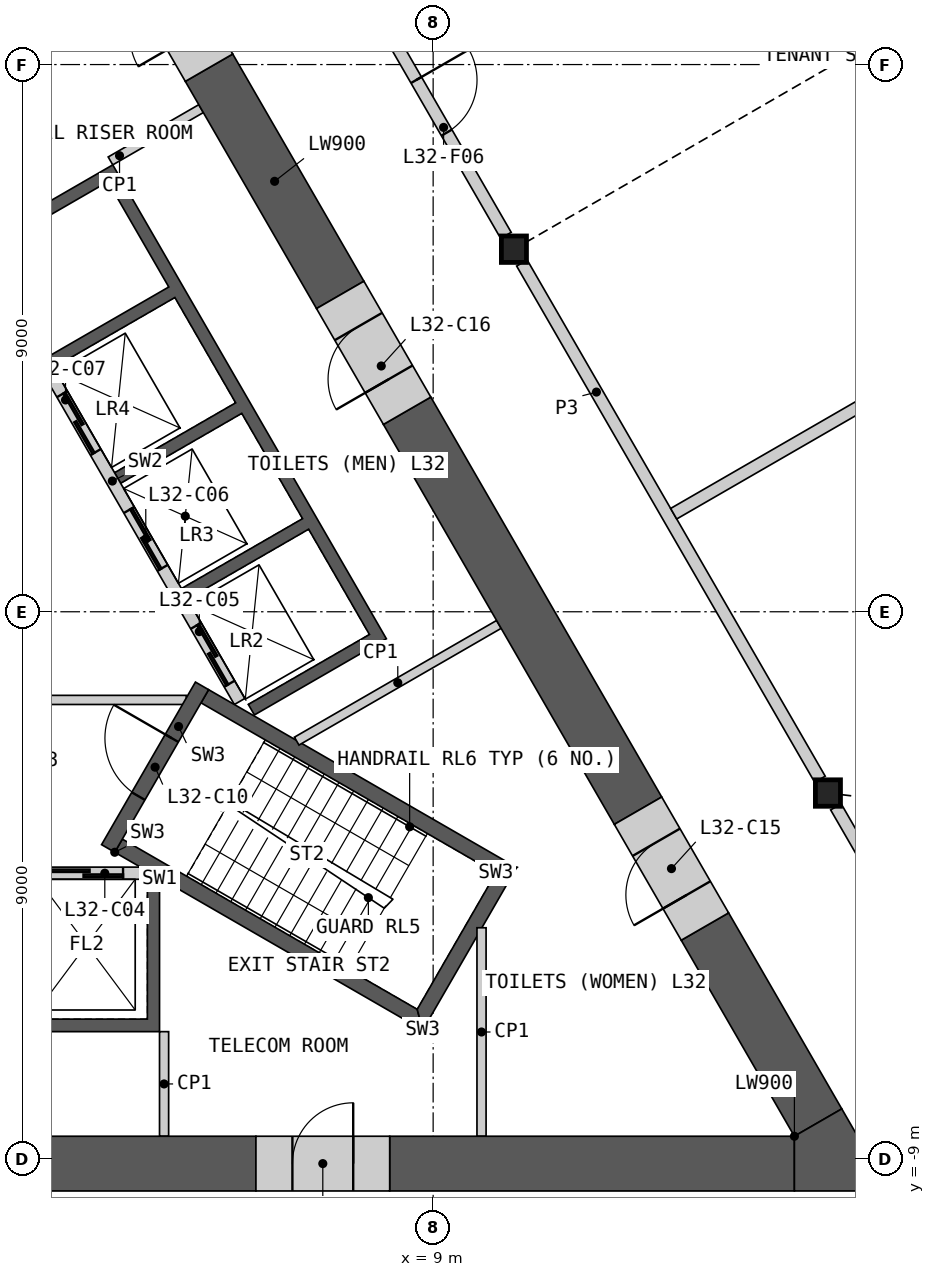
"""IFC4 building model, lengths in metres.
Left out: names, types, materials, properties, quantities, classifications, styles, units other than length and angle.
Written with IfcOpenShell. Run it as: python <this file> out.ifc"""

import sys

from ifc_helpers import new_model, si_unit, direction, frame, frame_2d, origin, origin_2d, place, context, subcontext, project, spatial, polyline, rectangle, i_section, outline, extrude, element, fill, save


model = new_model("IFC4")
c1 = context("Model", 3, precision=1e-05, world=origin(), true_north=direction((0.0, 1.0)))
c2 = subcontext(c1, "Body", "Model", "MODEL_VIEW")
j1 = project(units=[si_unit("LENGTHUNIT", "METRE"), si_unit("PLANEANGLEUNIT", "RADIAN")], contexts=[c1])
p1 = place(None, origin())
s1 = spatial("IfcSite", under=j1, at=p1, CompositionType="ELEMENT")
p2 = place(p1, origin())
s2 = spatial("IfcBuilding", under=s1, at=p2, CompositionType="ELEMENT")
p3 = place(p2, frame((0.0, 0.0, 150.0)))
s3 = spatial("IfcBuildingStorey", under=s2, at=p3, CompositionType="ELEMENT", Elevation=150.0)
for number, where, z_axis, x_axis in (
    (1, (15.493, -2.982, 0.0), (0.0, 0.0, 1.0), (1.0, 0.0, 0.0)),
    (2, (10.328, 5.963, 0.0), (0.0, 0.0, 1.0), (1.0, 0.0, 0.0)),
):
    element("IfcColumn", number, at=place(p3, frame(where, z_axis=z_axis, x_axis=x_axis)), inside=s3, PredefinedType="COLUMN", context=c2, shape_type="SweptSolid", body=[
        extrude(i_section(OverallWidth=0.412, OverallDepth=0.435, WebThickness=0.036, FlangeThickness=0.057, at=origin_2d()), origin(), (0.0, 0.0, 1.0), 4.2),
    ])
p4 = place(p3, origin())
e3 = element("IfcWall", 3, at=p4, inside=s3, PredefinedType="SHEAR", context=c2, shape_type="SweptSolid", body=[
    extrude(outline(polyline([(4.5, -4.4), (4.5, -6.906), (-4.5, -6.906), (-4.5, -4.4), (-4.3, -4.4), (-4.3, -6.7), (-2.3, -6.7), (-2.3, -4.4), (-2.1, -4.4), (-2.1, -6.7), (-0.1, -6.7), (-0.1, -4.4), (0.1, -4.4), (0.1, -6.7), (2.1, -6.7), (2.1, -4.4), (2.3, -4.4), (2.3, -6.7), (4.3, -6.7), (4.3, -4.4), (4.5, -4.4)])), origin(), (0.0, 0.0, 1.0), 3.8),
])
p5 = place(p3, frame((-4.187, -4.3, 0.0), z_axis=(0.0, 0.0, 1.0), x_axis=(1.0, 0.0, 0.0)))
e4 = element("IfcWall", 4, at=p5, inside=s3, PredefinedType="SOLIDWALL", context=c2, shape_type="SweptSolid", body=[
    extrude(rectangle(XDim=8.373, YDim=0.2, at=frame_2d((4.187, 0.0))), origin(), (0.0, 0.0, 1.0), 3.8),
])
p6 = place(p5, frame((0.287, 0.0, 0.0)))
e5 = element("IfcOpeningElement", 5, at=p6, cuts=e4, PredefinedType="OPENING", context=c2, shape_type="SweptSolid", body=[
    extrude(rectangle(XDim=1.2, YDim=2.1, at=frame_2d((0.6, 1.05))), frame((0.0, 0.11, 0.0), z_axis=(0.0, -1.0, 0.0), x_axis=(1.0, 0.0, 0.0)), (0.0, 0.0, 1.0), 0.22),
])
p7 = place(p5, frame((2.387, 0.0, 0.0)))
e6 = element("IfcOpeningElement", 6, at=p7, cuts=e4, PredefinedType="OPENING", context=c2, shape_type="SweptSolid", body=[
    extrude(rectangle(XDim=1.4, YDim=2.1, at=frame_2d((0.7, 1.05))), frame((0.0, 0.11, 0.0), z_axis=(0.0, -1.0, 0.0), x_axis=(1.0, 0.0, 0.0)), (0.0, 0.0, 1.0), 0.22),
])
p8 = place(p5, frame((4.737, 0.0, 0.0)))
e7 = element("IfcOpeningElement", 7, at=p8, cuts=e4, PredefinedType="OPENING", context=c2, shape_type="SweptSolid", body=[
    extrude(rectangle(XDim=1.1, YDim=2.1, at=frame_2d((0.55, 1.05))), frame((0.0, 0.11, 0.0), z_axis=(0.0, -1.0, 0.0), x_axis=(1.0, 0.0, 0.0)), (0.0, 0.0, 1.0), 0.22),
])
p9 = place(p5, frame((6.887, 0.0, 0.0)))
e8 = element("IfcOpeningElement", 8, at=p9, cuts=e4, PredefinedType="OPENING", context=c2, shape_type="SweptSolid", body=[
    extrude(rectangle(XDim=1.2, YDim=2.1, at=frame_2d((0.6, 1.05))), frame((0.0, 0.11, 0.0), z_axis=(0.0, -1.0, 0.0), x_axis=(1.0, 0.0, 0.0)), (0.0, 0.0, 1.0), 0.22),
])
p10 = place(p3, origin())
e9 = element("IfcWall", 9, at=p10, inside=s3, PredefinedType="SHEAR", context=c2, shape_type="SweptSolid", body=[
    extrude(outline(polyline([(1.561, 6.097), (3.731, 7.35), (8.231, -0.444), (6.061, -1.697), (5.96, -1.524), (7.952, -0.374), (6.952, 1.358), (4.96, 0.208), (4.861, 0.381), (6.852, 1.531), (5.852, 3.263), (3.861, 2.113), (3.76, 2.287), (5.752, 3.437), (4.752, 5.169), (2.76, 4.019), (2.66, 4.192), (4.652, 5.342), (3.652, 7.074), (1.66, 5.924), (1.561, 6.097)])), origin(), (0.0, 0.0, 1.0), 3.8),
])
p11 = place(p3, frame((5.817, -1.476, 0.0), z_axis=(0.0, 0.0, 1.0), x_axis=(-0.500002616675, 0.866023893041, 0.0)))
e10 = element("IfcWall", 10, at=p11, inside=s3, PredefinedType="SOLIDWALL", context=c2, shape_type="SweptSolid", body=[
    extrude(rectangle(XDim=8.373, YDim=0.2, at=frame_2d((4.187, 0.0))), origin(), (0.0, 0.0, 1.0), 3.8),
])
p12 = place(p11, frame((0.337, 0.0, 0.0)))
e11 = element("IfcOpeningElement", 11, at=p12, cuts=e10, PredefinedType="OPENING", context=c2, shape_type="SweptSolid", body=[
    extrude(rectangle(XDim=1.1, YDim=2.1, at=frame_2d((0.55, 1.05))), frame((0.0, 0.11, 0.0), z_axis=(0.0, -1.0, 0.0), x_axis=(1.0, 0.0, 0.0)), (0.0, 0.0, 1.0), 0.22),
])
p13 = place(p11, frame((2.537, 0.0, 0.0)))
e12 = element("IfcOpeningElement", 12, at=p13, cuts=e10, PredefinedType="OPENING", context=c2, shape_type="SweptSolid", body=[
    extrude(rectangle(XDim=1.1, YDim=2.1, at=frame_2d((0.55, 1.05))), frame((0.0, 0.11, 0.0), z_axis=(0.0, -1.0, 0.0), x_axis=(1.0, 0.0, 0.0)), (0.0, 0.0, 1.0), 0.22),
])
p14 = place(p11, frame((4.737, 0.0, 0.0)))
e13 = element("IfcOpeningElement", 13, at=p14, cuts=e10, PredefinedType="OPENING", context=c2, shape_type="SweptSolid", body=[
    extrude(rectangle(XDim=1.1, YDim=2.1, at=frame_2d((0.55, 1.05))), frame((0.0, 0.11, 0.0), z_axis=(0.0, -1.0, 0.0), x_axis=(1.0, 0.0, 0.0)), (0.0, 0.0, 1.0), 0.22),
])
p15 = place(p3, frame((-4.941, -1.45, 0.0), z_axis=(0.0, 0.0, 1.0), x_axis=(1.0, 0.0, 0.0)))
e14 = element("IfcWall", 14, at=p15, inside=s3, PredefinedType="PARTITIONING", context=c2, shape_type="SweptSolid", body=[
    extrude(rectangle(XDim=9.882, YDim=0.15, at=frame_2d((4.941, 0.0))), origin(), (0.0, 0.0, 1.0), 3.8),
])
p16 = place(p15, frame((4.391, 0.0, 0.0)))
e15 = element("IfcOpeningElement", 15, at=p16, cuts=e14, PredefinedType="OPENING", context=c2, shape_type="SweptSolid", body=[
    extrude(rectangle(XDim=1.1, YDim=2.1, at=frame_2d((0.55, 1.05))), frame((0.0, 0.085, 0.0), z_axis=(0.0, -1.0, 0.0), x_axis=(1.0, 0.0, 0.0)), (0.0, 0.0, 1.0), 0.17),
])
p17 = place(p3, origin())
e16 = element("IfcWall", 16, at=p17, inside=s3, PredefinedType="SHEAR", context=c2, shape_type="SweptSolid", body=[
    extrude(outline(polyline([(3.763, -3.956), (8.83, -6.881), (8.738, -6.539), (3.888, -3.739), (3.763, -3.956)])), origin(), (0.0, 0.0, 1.0), 3.8),
])
p18 = place(p3, origin())
e17 = element("IfcWall", 17, at=p18, inside=s3, PredefinedType="SHEAR", context=c2, shape_type="SweptSolid", body=[
    extrude(outline(polyline([(8.83, -6.881), (10.374, -4.206), (10.032, -4.298), (8.738, -6.539), (8.83, -6.881)])), origin(), (0.0, 0.0, 1.0), 3.8),
])
p19 = place(p3, origin())
e18 = element("IfcWall", 18, at=p19, inside=s3, PredefinedType="SHEAR", context=c2, shape_type="SweptSolid", body=[
    extrude(outline(polyline([(10.032, -4.298), (10.374, -4.206), (5.307, -1.281), (5.182, -1.498), (10.032, -4.298)])), origin(), (0.0, 0.0, 1.0), 3.8),
])
p20 = place(p3, frame((3.655, -3.893, 0.0), z_axis=(0.0, 0.0, 1.0), x_axis=(0.499982516597, 0.866035497597, 0.0)))
e19 = element("IfcWall", 19, at=p20, inside=s3, PredefinedType="SHEAR", context=c2, shape_type="SweptSolid", body=[
    extrude(rectangle(XDim=3.088, YDim=0.25, at=frame_2d((1.544, 0.0))), origin(), (0.0, 0.0, 1.0), 3.8),
])
p21 = place(p20, frame((0.994, 0.0, 0.0)))
e20 = element("IfcOpeningElement", 20, at=p21, cuts=e19, PredefinedType="OPENING", context=c2, shape_type="SweptSolid", body=[
    extrude(rectangle(XDim=1.1, YDim=2.1, at=frame_2d((0.55, 1.05))), frame((0.0, 0.135, 0.0), z_axis=(0.0, -1.0, 0.0), x_axis=(1.0, 0.0, 0.0)), (0.0, 0.0, 1.0), 0.27),
])
for number, where, z_axis, x_axis in (
    (21, (4.575, -6.906, 0.0), (0.0, 0.0, 1.0), (0.0, -1.0, 0.0)),
    (22, (3.693, 7.415, 0.0), (0.0, 0.0, 1.0), (0.866, 0.5, 0.0)),
):
    element("IfcWall", number, at=place(p3, frame(where, z_axis=z_axis, x_axis=x_axis)), inside=s3, PredefinedType="PARTITIONING", context=c2, shape_type="SweptSolid", body=[
        extrude(rectangle(XDim=1.72, YDim=0.15, at=frame_2d((0.86, 0.0))), origin(), (0.0, 0.0, 1.0), 3.8),
    ])
p22 = place(p3, frame((10.081, -0.208, 0.0), z_axis=(0.0, 0.0, 1.0), x_axis=(-0.86600766878, -0.50003071667, 0.0)))
e23 = element("IfcWall", 23, at=p22, inside=s3, PredefinedType="PARTITIONING", context=c2, shape_type="SweptSolid", body=[
    extrude(rectangle(XDim=3.839, YDim=0.15, at=frame_2d((1.919, 0.0))), origin(), (0.0, 0.0, 1.0), 3.8),
])
p23 = place(p3, frame((9.796, -8.626, 0.0), z_axis=(0.0, 0.0, 1.0), x_axis=(0.0, 1.0, 0.0)))
e24 = element("IfcWall", 24, at=p23, inside=s3, PredefinedType="PARTITIONING", context=c2, shape_type="SweptSolid", body=[
    extrude(rectangle(XDim=3.429, YDim=0.15, at=frame_2d((1.714, 0.0))), origin(), (0.0, 0.0, 1.0), 3.8),
])
p24 = place(p3, frame((8.285, -9.076, 0.0), z_axis=(0.0, 0.0, 1.0), x_axis=(1.0, 0.0, 0.0)))
e25 = element("IfcWall", 25, at=p24, inside=s3, PredefinedType="SHEAR", context=c2, shape_type="SweptSolid", body=[
    extrude(rectangle(XDim=6.656, YDim=0.9, at=frame_2d((3.328, 0.0))), origin(), (0.0, 0.0, 1.0), 3.8),
])
p25 = place(p3, frame((1.1, -9.076, 0.0), z_axis=(0.0, 0.0, 1.0), x_axis=(1.0, 0.0, 0.0)))
e26 = element("IfcWall", 26, at=p25, inside=s3, PredefinedType="SHEAR", context=c2, shape_type="SweptSolid", body=[
    extrude(rectangle(XDim=4.985, YDim=0.9, at=frame_2d((2.493, 0.0))), origin(), (0.0, 0.0, 1.0), 3.8),
])
p26 = place(p3, frame((12.369, -3.272, 0.0), z_axis=(0.0, 0.0, 1.0), x_axis=(-0.499986781806, 0.866033035178, 0.0)))
e27 = element("IfcWall", 27, at=p26, inside=s3, PredefinedType="SHEAR", context=c2, shape_type="SweptSolid", body=[
    extrude(rectangle(XDim=7.595, YDim=0.9, at=frame_2d((3.798, 0.0))), origin(), (0.0, 0.0, 1.0), 3.8),
])
p27 = place(p3, frame((7.472, 5.211, 0.0), z_axis=(0.0, 0.0, 1.0), x_axis=(-0.499996693808, 0.866027312607, 0.0)))
e28 = element("IfcWall", 28, at=p27, inside=s3, PredefinedType="SHEAR", context=c2, shape_type="SweptSolid", body=[
    extrude(rectangle(XDim=4.315, YDim=0.9, at=frame_2d((2.158, 0.0))), origin(), (0.0, 0.0, 1.0), 3.8),
])
p28 = place(p3, frame((15.331, -8.401, 0.0), z_axis=(0.0, 0.0, 1.0), x_axis=(-0.499976014784, 0.866039251212, 0.0)))
e29 = element("IfcWall", 29, at=p28, inside=s3, PredefinedType="SHEAR", context=c2, shape_type="SweptSolid", body=[
    extrude(rectangle(XDim=3.723, YDim=0.9, at=frame_2d((1.861, 0.0))), origin(), (0.0, 0.0, 1.0), 3.8),
])
p29 = place(p3, origin())
e30 = element("IfcWall", 30, at=p29, inside=s3, PredefinedType="SHEAR", context=c2, shape_type="SweptSolid", body=[
    extrude(outline(polyline([(14.941, -8.626), (15.721, -8.176), (16.5, -9.526), (14.941, -9.526), (14.941, -8.626)])), origin(), (0.0, 0.0, 1.0), 3.8),
])
p30 = place(p3, frame((6.085, -9.076, 0.0), z_axis=(0.0, 0.0, 1.0), x_axis=(1.0, 0.0, 0.0)))
e31 = element("IfcWall", 31, at=p30, inside=s3, PredefinedType="SHEAR", context=c2, shape_type="SweptSolid", body=[
    extrude(rectangle(XDim=2.2, YDim=0.9, at=frame_2d((1.1, 0.0))), origin(), (0.0, 0.0, 1.0), 3.8),
])
p31 = place(p30, frame((0.6, 0.0, 0.0)))
e32 = element("IfcOpeningElement", 32, at=p31, cuts=e31, PredefinedType="OPENING", context=c2, shape_type="SweptSolid", body=[
    extrude(rectangle(XDim=1.0, YDim=2.1, at=frame_2d((0.5, 1.05))), frame((0.0, 0.46, 0.0), z_axis=(0.0, -1.0, 0.0), x_axis=(1.0, 0.0, 0.0)), (0.0, 0.0, 1.0), 0.92),
])
p32 = place(p3, frame((13.469, -5.177, 0.0), z_axis=(0.0, 0.0, 1.0), x_axis=(-0.50002983664, 0.866008176907, 0.0)))
e33 = element("IfcWall", 33, at=p32, inside=s3, PredefinedType="SHEAR", context=c2, shape_type="SweptSolid", body=[
    extrude(rectangle(XDim=2.2, YDim=0.9, at=frame_2d((1.1, 0.0))), origin(), (0.0, 0.0, 1.0), 3.8),
])
p33 = place(p32, frame((0.6, 0.0, 0.0)))
e34 = element("IfcOpeningElement", 34, at=p33, cuts=e33, PredefinedType="OPENING", context=c2, shape_type="SweptSolid", body=[
    extrude(rectangle(XDim=1.0, YDim=2.1, at=frame_2d((0.5, 1.05))), frame((0.0, 0.46, 0.0), z_axis=(0.0, -1.0, 0.0), x_axis=(1.0, 0.0, 0.0)), (0.0, 0.0, 1.0), 0.92),
])
p34 = place(p3, frame((8.572, 3.306, 0.0), z_axis=(0.0, 0.0, 1.0), x_axis=(-0.50002983664, 0.866008176907, 0.0)))
e35 = element("IfcWall", 35, at=p34, inside=s3, PredefinedType="SHEAR", context=c2, shape_type="SweptSolid", body=[
    extrude(rectangle(XDim=2.2, YDim=0.9, at=frame_2d((1.1, 0.0))), origin(), (0.0, 0.0, 1.0), 3.8),
])
p35 = place(p34, frame((0.6, 0.0, 0.0)))
e36 = element("IfcOpeningElement", 36, at=p35, cuts=e35, PredefinedType="OPENING", context=c2, shape_type="SweptSolid", body=[
    extrude(rectangle(XDim=1.0, YDim=2.1, at=frame_2d((0.5, 1.05))), frame((0.0, 0.46, 0.0), z_axis=(0.0, -1.0, 0.0), x_axis=(1.0, 0.0, 0.0)), (0.0, 0.0, 1.0), 0.92),
])
p36 = place(p3, frame((5.314, 8.948, 0.0), z_axis=(0.0, 0.0, 1.0), x_axis=(-0.500077893725, 0.86598042715, 0.0)))
e37 = element("IfcWall", 37, at=p36, inside=s3, PredefinedType="SHEAR", context=c2, shape_type="SweptSolid", body=[
    extrude(rectangle(XDim=2.2, YDim=0.9, at=frame_2d((1.1, 0.0))), origin(), (0.0, 0.0, 1.0), 3.8),
])
p37 = place(p36, frame((0.6, 0.0, 0.0)))
e38 = element("IfcOpeningElement", 38, at=p37, cuts=e37, PredefinedType="OPENING", context=c2, shape_type="SweptSolid", body=[
    extrude(rectangle(XDim=1.0, YDim=2.1, at=frame_2d((0.5, 1.05))), frame((0.0, 0.46, 0.0), z_axis=(0.0, -1.0, 0.0), x_axis=(1.0, 0.0, 0.0)), (0.0, 0.0, 1.0), 0.92),
])
p38 = place(p3, frame((10.46, 5.736, 0.0), z_axis=(0.0, 0.0, 1.0), x_axis=(0.500004141693, -0.866023012564, 0.0)))
e39 = element("IfcWall", 39, at=p38, inside=s3, PredefinedType="PARTITIONING", context=c2, shape_type="SweptSolid", body=[
    extrude(rectangle(XDim=9.803, YDim=0.2, at=frame_2d((4.902, 0.0))), origin(), (0.0, 0.0, 1.0), 3.8),
])
p39 = place(p3, frame((5.295, 14.68, 0.0), z_axis=(0.0, 0.0, 1.0), x_axis=(0.500012035596, -0.866018454918, 0.0)))
e40 = element("IfcWall", 40, at=p39, inside=s3, PredefinedType="PARTITIONING", context=c2, shape_type="SweptSolid", body=[
    extrude(rectangle(XDim=9.803, YDim=0.2, at=frame_2d((4.902, 0.0))), origin(), (0.0, 0.0, 1.0), 3.8),
])
p40 = place(p39, frame((6.853, 0.0, 0.0)))
e41 = element("IfcOpeningElement", 41, at=p40, cuts=e40, PredefinedType="OPENING", context=c2, shape_type="SweptSolid", body=[
    extrude(rectangle(XDim=1.0, YDim=2.1, at=frame_2d((0.5, 1.05))), frame((0.0, 0.11, 0.0), z_axis=(0.0, -1.0, 0.0), x_axis=(1.0, 0.0, 0.0)), (0.0, 0.0, 1.0), 0.22),
])
p41 = place(p3, frame((15.624, -3.209, 0.0), z_axis=(0.0, 0.0, 1.0), x_axis=(0.499997920671, -0.866026604282, 0.0)))
e42 = element("IfcWall", 42, at=p41, inside=s3, PredefinedType="PARTITIONING", context=c2, shape_type="SweptSolid", body=[
    extrude(rectangle(XDim=6.24, YDim=0.2, at=frame_2d((3.12, 0.0))), origin(), (0.0, 0.0, 1.0), 3.8),
])
p42 = place(p41, frame((2.169, 0.0, 0.0)))
e43 = element("IfcOpeningElement", 43, at=p42, cuts=e42, PredefinedType="OPENING", context=c2, shape_type="SweptSolid", body=[
    extrude(rectangle(XDim=1.8, YDim=2.1, at=frame_2d((0.9, 1.05))), frame((0.0, 0.11, 0.0), z_axis=(0.0, -1.0, 0.0), x_axis=(1.0, 0.0, 0.0)), (0.0, 0.0, 1.0), 0.22),
])
p43 = place(p3, frame((12.956, 1.613, 0.0), z_axis=(0.0, 0.0, 1.0), x_axis=(0.866032027724, 0.499988526824, 0.0)))
e44 = element("IfcWall", 44, at=p43, inside=s3, PredefinedType="PARTITIONING", context=c2, shape_type="SweptSolid", body=[
    extrude(rectangle(XDim=8.26, YDim=0.2, at=frame_2d((4.13, 0.0))), origin(), (0.0, 0.0, 1.0), 2.885),
])
p44 = place(p9, origin())
e45 = element("IfcDoor", 45, at=p44, inside=s3, OperationType="SLIDING_TO_LEFT", PredefinedType="DOOR", context=c2, shape_type="SweptSolid", body=[
    extrude(rectangle(XDim=1.2, YDim=2.1, at=frame_2d((0.6, 1.05))), frame((0.0, 0.025, 0.0), z_axis=(0.0, -1.0, 0.0), x_axis=(1.0, 0.0, 0.0)), (0.0, 0.0, 1.0), 0.05),
])
fill(e8, e45)
p45 = place(p12, origin())
e46 = element("IfcDoor", 46, at=p45, inside=s3, OperationType="SLIDING_TO_LEFT", PredefinedType="DOOR", context=c2, shape_type="SweptSolid", body=[
    extrude(rectangle(XDim=1.1, YDim=2.1, at=frame_2d((0.55, 1.05))), frame((0.0, 0.025, 0.0), z_axis=(0.0, -1.0, 0.0), x_axis=(1.0, 0.0, 0.0)), (0.0, 0.0, 1.0), 0.05),
])
fill(e11, e46)
p46 = place(p13, origin())
e47 = element("IfcDoor", 47, at=p46, inside=s3, OperationType="SLIDING_TO_LEFT", PredefinedType="DOOR", context=c2, shape_type="SweptSolid", body=[
    extrude(rectangle(XDim=1.1, YDim=2.1, at=frame_2d((0.55, 1.05))), frame((0.0, 0.025, 0.0), z_axis=(0.0, -1.0, 0.0), x_axis=(1.0, 0.0, 0.0)), (0.0, 0.0, 1.0), 0.05),
])
fill(e12, e47)
p47 = place(p14, origin())
e48 = element("IfcDoor", 48, at=p47, inside=s3, OperationType="SLIDING_TO_LEFT", PredefinedType="DOOR", context=c2, shape_type="SweptSolid", body=[
    extrude(rectangle(XDim=1.1, YDim=2.1, at=frame_2d((0.55, 1.05))), frame((0.0, 0.025, 0.0), z_axis=(0.0, -1.0, 0.0), x_axis=(1.0, 0.0, 0.0)), (0.0, 0.0, 1.0), 0.05),
])
fill(e13, e48)
p48 = place(p21, origin())
e49 = element("IfcDoor", 49, at=p48, inside=s3, OperationType="SINGLE_SWING_RIGHT", PredefinedType="DOOR", context=c2, shape_type="SweptSolid", body=[
    extrude(rectangle(XDim=1.1, YDim=2.1, at=frame_2d((0.55, 1.05))), frame((0.0, 0.025, 0.0), z_axis=(0.0, -1.0, 0.0), x_axis=(1.0, 0.0, 0.0)), (0.0, 0.0, 1.0), 0.05),
])
fill(e20, e49)
p49 = place(p31, origin())
e50 = element("IfcDoor", 50, at=p49, inside=s3, OperationType="SINGLE_SWING_RIGHT", PredefinedType="DOOR", context=c2, shape_type="SweptSolid", body=[
    extrude(rectangle(XDim=1.0, YDim=2.1, at=frame_2d((0.5, 1.05))), frame((0.0, 0.205, 0.0), z_axis=(0.0, -1.0, 0.0), x_axis=(1.0, 0.0, 0.0)), (0.0, 0.0, 1.0), 0.05),
])
fill(e32, e50)
p50 = place(p33, origin())
e51 = element("IfcDoor", 51, at=p50, inside=s3, OperationType="SINGLE_SWING_LEFT", PredefinedType="DOOR", context=c2, shape_type="SweptSolid", body=[
    extrude(rectangle(XDim=1.0, YDim=2.1, at=frame_2d((0.5, 1.05))), frame((0.0, 0.205, 0.0), z_axis=(0.0, -1.0, 0.0), x_axis=(1.0, 0.0, 0.0)), (0.0, 0.0, 1.0), 0.05),
])
fill(e34, e51)
p51 = place(p35, origin())
e52 = element("IfcDoor", 52, at=p51, inside=s3, OperationType="SINGLE_SWING_LEFT", PredefinedType="DOOR", context=c2, shape_type="SweptSolid", body=[
    extrude(rectangle(XDim=1.0, YDim=2.1, at=frame_2d((0.5, 1.05))), frame((0.0, 0.205, 0.0), z_axis=(0.0, -1.0, 0.0), x_axis=(1.0, 0.0, 0.0)), (0.0, 0.0, 1.0), 0.05),
])
fill(e36, e52)
p52 = place(p40, origin())
e53 = element("IfcDoor", 53, at=p52, inside=s3, OperationType="SINGLE_SWING_LEFT", PredefinedType="DOOR", context=c2, shape_type="SweptSolid", body=[
    extrude(rectangle(XDim=1.0, YDim=2.1, at=frame_2d((0.5, 1.05))), frame((0.0, 0.025, 0.0), z_axis=(0.0, -1.0, 0.0), x_axis=(1.0, 0.0, 0.0)), (0.0, 0.0, 1.0), 0.05),
])
fill(e41, e53)
save(model, sys.argv[1])
